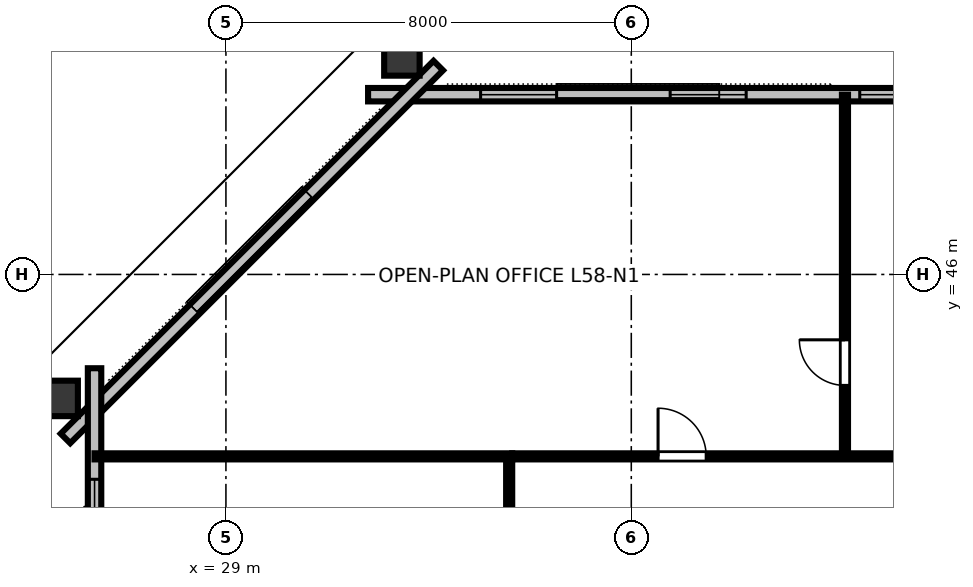
"""IFC4 building model, lengths in metres.
Left out: names, types, materials, properties, quantities, classifications, styles, units other than length and angle.
Written with IfcOpenShell. Run it as: python <this file> out.ifc"""

import sys

from ifc_helpers import new_model, si_unit, direction, frame, frame_2d, origin, origin_2d, place, context, subcontext, project, spatial, rectangle, hollow_rectangle, extrude, element, fill, save


model = new_model("IFC4")
c1 = context("Model", 3, precision=1e-05, world=origin(), true_north=direction((0.0, 1.0)))
c2 = subcontext(c1, "Body", "Model", "MODEL_VIEW")
j1 = project(units=[si_unit("LENGTHUNIT", "METRE"), si_unit("PLANEANGLEUNIT", "RADIAN")], contexts=[c1])
p1 = place(None, origin())
s1 = spatial("IfcSite", under=j1, at=p1, CompositionType="ELEMENT")
p2 = place(p1, origin())
s2 = spatial("IfcBuilding", under=s1, at=p2, CompositionType="ELEMENT")
p3 = place(p2, frame((0.0, 0.0, 220.2)))
s3 = spatial("IfcBuildingStorey", under=s2, at=p3, CompositionType="ELEMENT", Elevation=220.2)
for number, where, z_axis, x_axis in (
    (1, (32.473, 50.348, 0.0), (0.0, 0.0, 1.0), (1.0, 0.0, 0.0)),
    (2, (25.653, 43.554, 0.0), (0.0, 0.0, 1.0), (0.0, 1.0, 0.0)),
):
    element("IfcColumn", number, at=place(p3, frame(where, z_axis=z_axis, x_axis=x_axis)), inside=s3, PredefinedType="COLUMN", context=c2, shape_type="SweptSolid", body=[
        extrude(hollow_rectangle(XDim=0.7, YDim=0.85, WallThickness=0.04, at=origin_2d()), origin(), (0.0, 0.0, 1.0), 3.373),
    ])
p4 = place(p3, frame((60.195, 49.547, 0.0), z_axis=(0.0, 0.0, 1.0), x_axis=(-1.0, 0.0, 0.0)))
e3 = element("IfcWall", 3, at=p4, inside=s3, PredefinedType="STANDARD", context=c2, shape_type="SweptSolid", body=[
    extrude(rectangle(XDim=28.389, YDim=0.265, at=frame_2d((14.195, 0.0))), origin(), (0.0, 0.0, 1.0), 3.375),
])
p5 = place(p4, frame((2.221, 0.0, 0.85)))
e4 = element("IfcOpeningElement", 4, at=p5, cuts=e3, PredefinedType="OPENING", context=c2, shape_type="SweptSolid", body=[
    extrude(rectangle(XDim=1.5, YDim=1.85, at=frame_2d((0.75, 0.925))), frame((0.0, 0.142, 0.0), z_axis=(0.0, -1.0, 0.0), x_axis=(1.0, 0.0, 0.0)), (0.0, 0.0, 1.0), 0.285),
])
p6 = place(p4, frame((5.962, 0.0, 0.85)))
e5 = element("IfcOpeningElement", 5, at=p6, cuts=e3, PredefinedType="OPENING", context=c2, shape_type="SweptSolid", body=[
    extrude(rectangle(XDim=1.5, YDim=1.85, at=frame_2d((0.75, 0.925))), frame((0.0, 0.142, 0.0), z_axis=(0.0, -1.0, 0.0), x_axis=(1.0, 0.0, 0.0)), (0.0, 0.0, 1.0), 0.285),
])
p7 = place(p4, frame((9.703, 0.0, 0.85)))
e6 = element("IfcOpeningElement", 6, at=p7, cuts=e3, PredefinedType="OPENING", context=c2, shape_type="SweptSolid", body=[
    extrude(rectangle(XDim=1.5, YDim=1.85, at=frame_2d((0.75, 0.925))), frame((0.0, 0.142, 0.0), z_axis=(0.0, -1.0, 0.0), x_axis=(1.0, 0.0, 0.0)), (0.0, 0.0, 1.0), 0.285),
])
p8 = place(p4, frame((17.186, 0.0, 0.85)))
e7 = element("IfcOpeningElement", 7, at=p8, cuts=e3, PredefinedType="OPENING", context=c2, shape_type="SweptSolid", body=[
    extrude(rectangle(XDim=1.5, YDim=1.85, at=frame_2d((0.75, 0.925))), frame((0.0, 0.142, 0.0), z_axis=(0.0, -1.0, 0.0), x_axis=(1.0, 0.0, 0.0)), (0.0, 0.0, 1.0), 0.285),
])
p9 = place(p4, frame((20.927, 0.0, 0.85)))
e8 = element("IfcOpeningElement", 8, at=p9, cuts=e3, PredefinedType="OPENING", context=c2, shape_type="SweptSolid", body=[
    extrude(rectangle(XDim=1.5, YDim=1.85, at=frame_2d((0.75, 0.925))), frame((0.0, 0.142, 0.0), z_axis=(0.0, -1.0, 0.0), x_axis=(1.0, 0.0, 0.0)), (0.0, 0.0, 1.0), 0.285),
])
p10 = place(p4, frame((24.668, 0.0, 0.85)))
e9 = element("IfcOpeningElement", 9, at=p10, cuts=e3, PredefinedType="OPENING", context=c2, shape_type="SweptSolid", body=[
    extrude(rectangle(XDim=1.5, YDim=1.85, at=frame_2d((0.75, 0.925))), frame((0.0, 0.142, 0.0), z_axis=(0.0, -1.0, 0.0), x_axis=(1.0, 0.0, 0.0)), (0.0, 0.0, 1.0), 0.285),
])
p11 = place(p3, frame((33.191, 50.121, 0.0), z_axis=(0.0, 0.0, 1.0), x_axis=(-0.707106781187, -0.707106781187, 0.0)))
e10 = element("IfcWall", 10, at=p11, inside=s3, PredefinedType="STANDARD", context=c2, shape_type="SweptSolid", body=[
    extrude(rectangle(XDim=10.405, YDim=0.265, at=frame_2d((5.203, 0.0))), origin(), (0.0, 0.0, 1.0), 3.375),
])
p12 = place(p3, frame((26.407, 44.149, 0.0), z_axis=(0.0, 0.0, 1.0), x_axis=(0.0, -1.0, 0.0)))
e11 = element("IfcWall", 11, at=p12, inside=s3, PredefinedType="STANDARD", context=c2, shape_type="SweptSolid", body=[
    extrude(rectangle(XDim=24.298, YDim=0.265, at=frame_2d((12.149, 0.0))), origin(), (0.0, 0.0, 1.0), 3.375),
])
p13 = place(p12, frame((8.469, 0.0, 0.0)))
e12 = element("IfcOpeningElement", 12, at=p13, cuts=e11, PredefinedType="OPENING", context=c2, shape_type="SweptSolid", body=[
    extrude(rectangle(XDim=1.4, YDim=2.15, at=frame_2d((0.7, 1.075))), frame((0.0, 0.142, 0.0), z_axis=(0.0, -1.0, 0.0), x_axis=(1.0, 0.0, 0.0)), (0.0, 0.0, 1.0), 0.285),
])
p14 = place(p12, frame((2.191, 0.0, 0.85)))
e13 = element("IfcOpeningElement", 13, at=p14, cuts=e11, PredefinedType="OPENING", context=c2, shape_type="SweptSolid", body=[
    extrude(rectangle(XDim=1.5, YDim=1.85, at=frame_2d((0.75, 0.925))), frame((0.0, 0.142, 0.0), z_axis=(0.0, -1.0, 0.0), x_axis=(1.0, 0.0, 0.0)), (0.0, 0.0, 1.0), 0.285),
])
p15 = place(p12, frame((5.875, 0.0, 0.85)))
e14 = element("IfcOpeningElement", 14, at=p15, cuts=e11, PredefinedType="OPENING", context=c2, shape_type="SweptSolid", body=[
    extrude(rectangle(XDim=1.5, YDim=1.85, at=frame_2d((0.75, 0.925))), frame((0.0, 0.142, 0.0), z_axis=(0.0, -1.0, 0.0), x_axis=(1.0, 0.0, 0.0)), (0.0, 0.0, 1.0), 0.285),
])
p16 = place(p12, frame((13.24, 0.0, 0.85)))
e15 = element("IfcOpeningElement", 15, at=p16, cuts=e11, PredefinedType="OPENING", context=c2, shape_type="SweptSolid", body=[
    extrude(rectangle(XDim=1.5, YDim=1.85, at=frame_2d((0.75, 0.925))), frame((0.0, 0.142, 0.0), z_axis=(0.0, -1.0, 0.0), x_axis=(1.0, 0.0, 0.0)), (0.0, 0.0, 1.0), 0.285),
])
p17 = place(p12, frame((16.924, 0.0, 0.85)))
e16 = element("IfcOpeningElement", 16, at=p17, cuts=e11, PredefinedType="OPENING", context=c2, shape_type="SweptSolid", body=[
    extrude(rectangle(XDim=1.5, YDim=1.85, at=frame_2d((0.75, 0.925))), frame((0.0, 0.142, 0.0), z_axis=(0.0, -1.0, 0.0), x_axis=(1.0, 0.0, 0.0)), (0.0, 0.0, 1.0), 0.285),
])
p18 = place(p12, frame((20.607, 0.0, 0.85)))
e17 = element("IfcOpeningElement", 17, at=p18, cuts=e11, PredefinedType="OPENING", context=c2, shape_type="SweptSolid", body=[
    extrude(rectangle(XDim=1.5, YDim=1.85, at=frame_2d((0.75, 0.925))), frame((0.0, 0.142, 0.0), z_axis=(0.0, -1.0, 0.0), x_axis=(1.0, 0.0, 0.0)), (0.0, 0.0, 1.0), 0.285),
])
p19 = place(p3, frame((41.217, 42.41, 0.0), z_axis=(0.0, 0.0, 1.0), x_axis=(0.0, 1.0, 0.0)))
e18 = element("IfcWall", 18, at=p19, inside=s3, PredefinedType="PARTITIONING", context=c2, shape_type="SweptSolid", body=[
    extrude(rectangle(XDim=7.137, YDim=0.12, at=frame_2d((3.569, 0.0))), origin(), (0.0, 0.0, 1.0), 2.655),
])
p20 = place(p19, frame((1.4, 0.0, 0.0)))
e19 = element("IfcOpeningElement", 19, at=p20, cuts=e18, PredefinedType="OPENING", context=c2, shape_type="SweptSolid", body=[
    extrude(rectangle(XDim=0.9, YDim=2.15, at=frame_2d((0.45, 1.075))), frame((0.0, 0.07, 0.0), z_axis=(0.0, -1.0, 0.0), x_axis=(1.0, 0.0, 0.0)), (0.0, 0.0, 1.0), 0.14),
])
p21 = place(p3, frame((34.65, 42.41, 0.0), z_axis=(0.0, 0.0, 1.0), x_axis=(1.0, 0.0, 0.0)))
e20 = element("IfcWall", 20, at=p21, inside=s3, PredefinedType="PARTITIONING", context=c2, shape_type="SweptSolid", body=[
    extrude(rectangle(XDim=10.33, YDim=0.12, at=frame_2d((5.165, 0.0))), origin(), (0.0, 0.0, 1.0), 2.655),
])
p22 = place(p21, frame((2.878, 0.0, 0.0)))
e21 = element("IfcOpeningElement", 21, at=p22, cuts=e20, PredefinedType="OPENING", context=c2, shape_type="SweptSolid", body=[
    extrude(rectangle(XDim=0.95, YDim=2.15, at=frame_2d((0.475, 1.075))), frame((0.0, 0.07, 0.0), z_axis=(0.0, -1.0, 0.0), x_axis=(1.0, 0.0, 0.0)), (0.0, 0.0, 1.0), 0.14),
])
p23 = place(p21, frame((7.974, 0.0, 0.0)))
e22 = element("IfcOpeningElement", 22, at=p23, cuts=e20, PredefinedType="OPENING", context=c2, shape_type="SweptSolid", body=[
    extrude(rectangle(XDim=0.95, YDim=2.15, at=frame_2d((0.475, 1.075))), frame((0.0, 0.07, 0.0), z_axis=(0.0, -1.0, 0.0), x_axis=(1.0, 0.0, 0.0)), (0.0, 0.0, 1.0), 0.14),
])
p24 = place(p3, frame((34.59, 21.65, 0.0), z_axis=(0.0, 0.0, 1.0), x_axis=(0.0, 1.0, 0.0)))
e23 = element("IfcWall", 23, at=p24, inside=s3, PredefinedType="PARTITIONING", context=c2, shape_type="SweptSolid", body=[
    extrude(rectangle(XDim=20.7, YDim=0.12, at=frame_2d((10.35, 0.0))), origin(), (0.0, 0.0, 1.0), 2.655),
])
p25 = place(p24, frame((5.449, 0.0, 0.0)))
e24 = element("IfcOpeningElement", 24, at=p25, cuts=e23, PredefinedType="OPENING", context=c2, shape_type="SweptSolid", body=[
    extrude(rectangle(XDim=0.95, YDim=2.15, at=frame_2d((0.475, 1.075))), frame((0.0, 0.07, 0.0), z_axis=(0.0, -1.0, 0.0), x_axis=(1.0, 0.0, 0.0)), (0.0, 0.0, 1.0), 0.14),
])
p26 = place(p24, frame((15.599, 0.0, 0.0)))
e25 = element("IfcOpeningElement", 25, at=p26, cuts=e23, PredefinedType="OPENING", context=c2, shape_type="SweptSolid", body=[
    extrude(rectangle(XDim=0.95, YDim=2.15, at=frame_2d((0.475, 1.075))), frame((0.0, 0.07, 0.0), z_axis=(0.0, -1.0, 0.0), x_axis=(1.0, 0.0, 0.0)), (0.0, 0.0, 1.0), 0.14),
])
p27 = place(p3, frame((34.65, 42.41, 0.0), z_axis=(0.0, 0.0, 1.0), x_axis=(-1.0, 0.0, 0.0)))
e26 = element("IfcWall", 26, at=p27, inside=s3, PredefinedType="PARTITIONING", context=c2, shape_type="SweptSolid", body=[
    extrude(rectangle(XDim=8.243, YDim=0.12, at=frame_2d((4.121, 0.0))), origin(), (0.0, 0.0, 1.0), 2.655),
])
p28 = place(p8, origin())
e27 = element("IfcWindow", 27, at=p28, inside=s3, PartitioningType="SINGLE_PANEL", PredefinedType="WINDOW", context=c2, shape_type="SweptSolid", body=[
    extrude(rectangle(XDim=1.5, YDim=1.85, at=frame_2d((0.75, 0.925))), frame((0.0, 0.03, 0.0), z_axis=(0.0, -1.0, 0.0), x_axis=(1.0, 0.0, 0.0)), (0.0, 0.0, 1.0), 0.06),
])
fill(e7, e27)
p29 = place(p9, origin())
e28 = element("IfcWindow", 28, at=p29, inside=s3, PartitioningType="SINGLE_PANEL", PredefinedType="WINDOW", context=c2, shape_type="SweptSolid", body=[
    extrude(rectangle(XDim=1.5, YDim=1.85, at=frame_2d((0.75, 0.925))), frame((0.0, 0.03, 0.0), z_axis=(0.0, -1.0, 0.0), x_axis=(1.0, 0.0, 0.0)), (0.0, 0.0, 1.0), 0.06),
])
fill(e8, e28)
p30 = place(p10, origin())
e29 = element("IfcWindow", 29, at=p30, inside=s3, PartitioningType="SINGLE_PANEL", PredefinedType="WINDOW", context=c2, shape_type="SweptSolid", body=[
    extrude(rectangle(XDim=1.5, YDim=1.85, at=frame_2d((0.75, 0.925))), frame((0.0, 0.03, 0.0), z_axis=(0.0, -1.0, 0.0), x_axis=(1.0, 0.0, 0.0)), (0.0, 0.0, 1.0), 0.06),
])
fill(e9, e29)
p31 = place(p14, origin())
e30 = element("IfcWindow", 30, at=p31, inside=s3, PartitioningType="SINGLE_PANEL", PredefinedType="WINDOW", context=c2, shape_type="SweptSolid", body=[
    extrude(rectangle(XDim=1.5, YDim=1.85, at=frame_2d((0.75, 0.925))), frame((0.0, 0.03, 0.0), z_axis=(0.0, -1.0, 0.0), x_axis=(1.0, 0.0, 0.0)), (0.0, 0.0, 1.0), 0.06),
])
fill(e13, e30)
p32 = place(p20, origin())
e31 = element("IfcDoor", 31, at=p32, inside=s3, OperationType="SINGLE_SWING_RIGHT", PredefinedType="DOOR", context=c2, shape_type="SweptSolid", body=[
    extrude(rectangle(XDim=0.9, YDim=2.15, at=frame_2d((0.45, 1.075))), frame((0.0, 0.025, 0.0), z_axis=(0.0, -1.0, 0.0), x_axis=(1.0, 0.0, 0.0)), (0.0, 0.0, 1.0), 0.05),
])
fill(e19, e31)
p33 = place(p22, origin())
e32 = element("IfcDoor", 32, at=p33, inside=s3, OperationType="SINGLE_SWING_LEFT", PredefinedType="DOOR", context=c2, shape_type="SweptSolid", body=[
    extrude(rectangle(XDim=0.95, YDim=2.15, at=frame_2d((0.475, 1.075))), frame((0.0, 0.025, 0.0), z_axis=(0.0, -1.0, 0.0), x_axis=(1.0, 0.0, 0.0)), (0.0, 0.0, 1.0), 0.05),
])
fill(e21, e32)
save(model, sys.argv[1])
